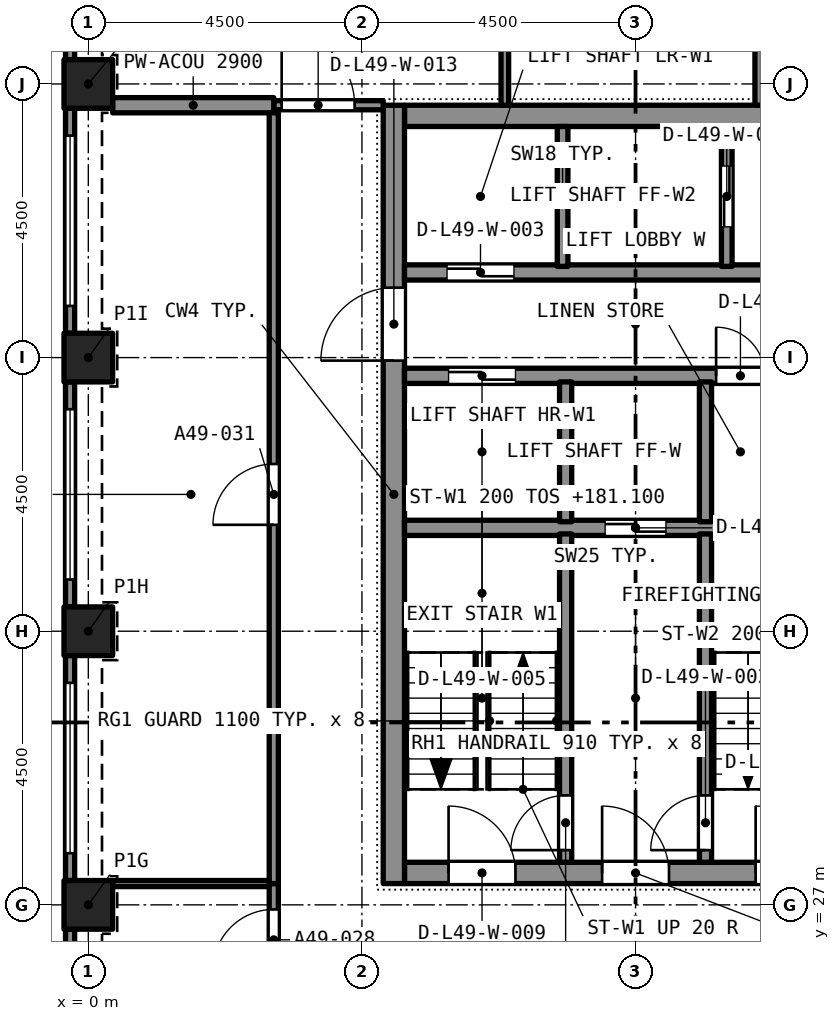
"""IFC4 building model, lengths in metres.
Left out: names, types, materials, properties, quantities, classifications, styles, units other than length and angle.
Written with IfcOpenShell. Run it as: python <this file> out.ifc"""

import sys

from ifc_helpers import new_model, si_unit, direction, frame, frame_2d, origin, origin_2d, place, context, subcontext, project, spatial, rectangle, extrude, element, fill, save


model = new_model("IFC4")
c1 = context("Model", 3, precision=1e-05, world=origin(), true_north=direction((0.0, 1.0)))
c2 = subcontext(c1, "Body", "Model", "MODEL_VIEW")
j1 = project(units=[si_unit("LENGTHUNIT", "METRE"), si_unit("PLANEANGLEUNIT", "RADIAN")], contexts=[c1])
p1 = place(None, origin())
s1 = spatial("IfcSite", under=j1, at=p1, CompositionType="ELEMENT")
p2 = place(p1, origin())
s2 = spatial("IfcBuilding", under=s1, at=p2, CompositionType="ELEMENT")
p3 = place(p2, frame((0.0, 0.0, 179.5)))
s3 = spatial("IfcBuildingStorey", under=s2, at=p3, CompositionType="ELEMENT", Elevation=179.5)
for number, where, z_axis, x_axis in (
    (1, (0.0, 27.0, 0.0), (0.0, 0.0, 1.0), (1.0, 0.0, 0.0)),
    (2, (0.0, 31.5, 0.0), (0.0, 0.0, 1.0), (1.0, 0.0, 0.0)),
    (3, (0.0, 36.0, 0.0), (0.0, 0.0, 1.0), (1.0, 0.0, 0.0)),
    (4, (0.0, 40.5, 0.0), (0.0, 0.0, 1.0), (1.0, 0.0, 0.0)),
):
    element("IfcColumn", number, at=place(p3, frame(where, z_axis=z_axis, x_axis=x_axis)), inside=s3, PredefinedType="COLUMN", context=c2, shape_type="SweptSolid", body=[
        extrude(rectangle(XDim=0.8, YDim=0.8, at=origin_2d()), origin(), (0.0, 0.0, 1.0), 3.2),
    ])
p4 = place(p3, frame((5.2, 27.525, 0.0), z_axis=(0.0, 0.0, 1.0), x_axis=(1.0, 0.0, 0.0)))
e5 = element("IfcWall", 5, at=p4, inside=s3, PredefinedType="SOLIDWALL", context=c2, shape_type="SweptSolid", body=[
    extrude(rectangle(XDim=7.6, YDim=0.35, at=frame_2d((3.8, 0.0))), origin(), (0.0, 0.0, 1.0), 3.2),
])
p5 = place(p4, frame((0.725, 0.0, 0.0)))
e6 = element("IfcOpeningElement", 6, at=p5, cuts=e5, PredefinedType="OPENING", context=c2, shape_type="SweptSolid", body=[
    extrude(rectangle(XDim=1.1, YDim=2.1, at=frame_2d((0.55, 1.05))), frame((0.0, 0.185, 0.0), z_axis=(0.0, -1.0, 0.0), x_axis=(1.0, 0.0, 0.0)), (0.0, 0.0, 1.0), 0.37),
])
p6 = place(p4, frame((3.25, 0.0, 0.0)))
e7 = element("IfcOpeningElement", 7, at=p6, cuts=e5, PredefinedType="OPENING", context=c2, shape_type="SweptSolid", body=[
    extrude(rectangle(XDim=1.1, YDim=2.1, at=frame_2d((0.55, 1.05))), frame((0.0, 0.185, 0.0), z_axis=(0.0, -1.0, 0.0), x_axis=(1.0, 0.0, 0.0)), (0.0, 0.0, 1.0), 0.37),
])
p7 = place(p4, frame((5.775, 0.0, 0.0)))
e8 = element("IfcOpeningElement", 8, at=p7, cuts=e5, PredefinedType="OPENING", context=c2, shape_type="SweptSolid", body=[
    extrude(rectangle(XDim=1.1, YDim=2.1, at=frame_2d((0.55, 1.05))), frame((0.0, 0.185, 0.0), z_axis=(0.0, -1.0, 0.0), x_axis=(1.0, 0.0, 0.0)), (0.0, 0.0, 1.0), 0.37),
])
p8 = place(p3, frame((5.2, 39.975, 0.0), z_axis=(0.0, 0.0, 1.0), x_axis=(1.0, 0.0, 0.0)))
e9 = element("IfcWall", 9, at=p8, inside=s3, PredefinedType="SOLIDWALL", context=c2, shape_type="SweptSolid", body=[
    extrude(rectangle(XDim=7.6, YDim=0.35, at=frame_2d((3.8, 0.0))), origin(), (0.0, 0.0, 1.0), 3.2),
])
p9 = place(p3, frame((5.025, 27.35, 0.0), z_axis=(0.0, 0.0, 1.0), x_axis=(0.0, 1.0, 0.0)))
e10 = element("IfcWall", 10, at=p9, inside=s3, PredefinedType="SOLIDWALL", context=c2, shape_type="SweptSolid", body=[
    extrude(rectangle(XDim=12.8, YDim=0.35, at=frame_2d((6.4, 0.0))), origin(), (0.0, 0.0, 1.0), 3.2),
])
p10 = place(p9, frame((8.6, 0.0, 0.0)))
e11 = element("IfcOpeningElement", 11, at=p10, cuts=e10, PredefinedType="OPENING", context=c2, shape_type="SweptSolid", body=[
    extrude(rectangle(XDim=1.2, YDim=2.1, at=frame_2d((0.6, 1.05))), frame((0.0, 0.185, 0.0), z_axis=(0.0, -1.0, 0.0), x_axis=(1.0, 0.0, 0.0)), (0.0, 0.0, 1.0), 0.37),
])
p11 = place(p3, frame((-0.3, 40.9, 0.0), z_axis=(0.0, 0.0, 1.0), x_axis=(0.0, 1.0, 0.0)))
e12 = element("IfcWall", 12, at=p11, inside=s3, PredefinedType="SOLIDWALL", context=c2, shape_type="SweptSolid", body=[
    extrude(rectangle(XDim=3.7, YDim=0.15, at=frame_2d((1.85, 0.0))), origin(), (0.0, 0.0, 1.0), 3.2),
])
p12 = place(p11, frame((0.45, 0.0, 0.45)))
e13 = element("IfcOpeningElement", 13, at=p12, cuts=e12, PredefinedType="OPENING", context=c2, shape_type="SweptSolid", body=[
    extrude(rectangle(XDim=2.8, YDim=1.95, at=frame_2d((1.4, 0.975))), frame((0.0, 0.085, 0.0), z_axis=(0.0, -1.0, 0.0), x_axis=(1.0, 0.0, 0.0)), (0.0, 0.0, 1.0), 0.17),
])
p13 = place(p3, frame((-0.3, 36.4, 0.0), z_axis=(0.0, 0.0, 1.0), x_axis=(0.0, 1.0, 0.0)))
e14 = element("IfcWall", 14, at=p13, inside=s3, PredefinedType="SOLIDWALL", context=c2, shape_type="SweptSolid", body=[
    extrude(rectangle(XDim=3.7, YDim=0.15, at=frame_2d((1.85, 0.0))), origin(), (0.0, 0.0, 1.0), 3.2),
])
p14 = place(p13, frame((0.45, 0.0, 0.45)))
e15 = element("IfcOpeningElement", 15, at=p14, cuts=e14, PredefinedType="OPENING", context=c2, shape_type="SweptSolid", body=[
    extrude(rectangle(XDim=2.8, YDim=1.95, at=frame_2d((1.4, 0.975))), frame((0.0, 0.085, 0.0), z_axis=(0.0, -1.0, 0.0), x_axis=(1.0, 0.0, 0.0)), (0.0, 0.0, 1.0), 0.17),
])
p15 = place(p3, frame((-0.3, 31.9, 0.0), z_axis=(0.0, 0.0, 1.0), x_axis=(0.0, 1.0, 0.0)))
e16 = element("IfcWall", 16, at=p15, inside=s3, PredefinedType="SOLIDWALL", context=c2, shape_type="SweptSolid", body=[
    extrude(rectangle(XDim=3.7, YDim=0.15, at=frame_2d((1.85, 0.0))), origin(), (0.0, 0.0, 1.0), 3.2),
])
p16 = place(p15, frame((0.45, 0.0, 0.45)))
e17 = element("IfcOpeningElement", 17, at=p16, cuts=e16, PredefinedType="OPENING", context=c2, shape_type="SweptSolid", body=[
    extrude(rectangle(XDim=2.8, YDim=1.95, at=frame_2d((1.4, 0.975))), frame((0.0, 0.085, 0.0), z_axis=(0.0, -1.0, 0.0), x_axis=(1.0, 0.0, 0.0)), (0.0, 0.0, 1.0), 0.17),
])
p17 = place(p3, frame((-0.3, 27.4, 0.0), z_axis=(0.0, 0.0, 1.0), x_axis=(0.0, 1.0, 0.0)))
e18 = element("IfcWall", 18, at=p17, inside=s3, PredefinedType="SOLIDWALL", context=c2, shape_type="SweptSolid", body=[
    extrude(rectangle(XDim=3.7, YDim=0.15, at=frame_2d((1.85, 0.0))), origin(), (0.0, 0.0, 1.0), 3.2),
])
p18 = place(p17, frame((0.45, 0.0, 0.45)))
e19 = element("IfcOpeningElement", 19, at=p18, cuts=e18, PredefinedType="OPENING", context=c2, shape_type="SweptSolid", body=[
    extrude(rectangle(XDim=2.8, YDim=1.95, at=frame_2d((1.4, 0.975))), frame((0.0, 0.085, 0.0), z_axis=(0.0, -1.0, 0.0), x_axis=(1.0, 0.0, 0.0)), (0.0, 0.0, 1.0), 0.17),
])
p19 = place(p3, frame((-0.3, 22.9, 0.0), z_axis=(0.0, 0.0, 1.0), x_axis=(0.0, 1.0, 0.0)))
e20 = element("IfcWall", 20, at=p19, inside=s3, PredefinedType="SOLIDWALL", context=c2, shape_type="SweptSolid", body=[
    extrude(rectangle(XDim=3.7, YDim=0.15, at=frame_2d((1.85, 0.0))), origin(), (0.0, 0.0, 1.0), 3.2),
])
p20 = place(p19, frame((0.45, 0.0, 0.45)))
e21 = element("IfcOpeningElement", 21, at=p20, cuts=e20, PredefinedType="OPENING", context=c2, shape_type="SweptSolid", body=[
    extrude(rectangle(XDim=2.8, YDim=1.95, at=frame_2d((1.4, 0.975))), frame((0.0, 0.085, 0.0), z_axis=(0.0, -1.0, 0.0), x_axis=(1.0, 0.0, 0.0)), (0.0, 0.0, 1.0), 0.17),
])
for number, where, z_axis, x_axis in (
    (22, (6.85, 40.15, 0.0), (0.0, 0.0, 1.0), (0.0, 1.0, 0.0)),
    (23, (11.026, 40.15, 0.0), (0.0, 0.0, 1.0), (0.0, 1.0, 0.0)),
):
    element("IfcWall", number, at=place(p3, frame(where, z_axis=z_axis, x_axis=x_axis)), inside=s3, PredefinedType="PARTITIONING", context=c2, shape_type="SweptSolid", body=[
        extrude(rectangle(XDim=3.368, YDim=0.125, at=frame_2d((1.684, 0.0))), origin(), (0.0, 0.0, 1.0), 2.9),
    ])
p21 = place(p3, frame((3.05, 40.15, 0.0), z_axis=(0.0, 0.0, 1.0), x_axis=(1.0, 0.0, 0.0)))
e24 = element("IfcWall", 24, at=p21, inside=s3, PredefinedType="PARTITIONING", context=c2, shape_type="SweptSolid", body=[
    extrude(rectangle(XDim=1.8, YDim=0.15, at=frame_2d((0.9, 0.0))), origin(), (0.0, 0.0, 1.0), 2.9),
])
p22 = place(p21, frame((0.13, 0.0, 0.0)))
e25 = element("IfcOpeningElement", 25, at=p22, cuts=e24, PredefinedType="OPENING", context=c2, shape_type="SweptSolid", body=[
    extrude(rectangle(XDim=1.2, YDim=2.4, at=frame_2d((0.6, 1.2))), frame((0.0, 0.085, 0.0), z_axis=(0.0, -1.0, 0.0), x_axis=(1.0, 0.0, 0.0)), (0.0, 0.0, 1.0), 0.17),
])
p23 = place(p3, frame((0.4, 40.15, 0.0), z_axis=(0.0, 0.0, 1.0), x_axis=(1.0, 0.0, 0.0)))
e26 = element("IfcWall", 26, at=p23, inside=s3, PredefinedType="PARTITIONING", context=c2, shape_type="SweptSolid", body=[
    extrude(rectangle(XDim=2.65, YDim=0.25, at=frame_2d((1.325, 0.0))), origin(), (0.0, 0.0, 1.0), 2.9),
])
p24 = place(p3, frame((3.05, 25.425, 0.0), z_axis=(0.0, 0.0, 1.0), x_axis=(0.0, 1.0, 0.0)))
e27 = element("IfcWall", 27, at=p24, inside=s3, PredefinedType="PARTITIONING", context=c2, shape_type="SweptSolid", body=[
    extrude(rectangle(XDim=1.925, YDim=0.15, at=frame_2d((0.962, 0.0))), origin(), (0.0, 0.0, 1.0), 2.9),
])
p25 = place(p24, frame((0.5, 0.0, 0.0)))
e28 = element("IfcOpeningElement", 28, at=p25, cuts=e27, PredefinedType="OPENING", context=c2, shape_type="SweptSolid", body=[
    extrude(rectangle(XDim=1.0, YDim=2.1, at=frame_2d((0.5, 1.05))), frame((0.0, 0.085, 0.0), z_axis=(0.0, -1.0, 0.0), x_axis=(1.0, 0.0, 0.0)), (0.0, 0.0, 1.0), 0.17),
])
p26 = place(p3, frame((3.05, 27.35, 0.0), z_axis=(0.0, 0.0, 1.0), x_axis=(0.0, 1.0, 0.0)))
e29 = element("IfcWall", 29, at=p26, inside=s3, PredefinedType="PARTITIONING", context=c2, shape_type="SweptSolid", body=[
    extrude(rectangle(XDim=12.675, YDim=0.15, at=frame_2d((6.337, 0.0))), origin(), (0.0, 0.0, 1.0), 2.9),
])
p27 = place(p26, frame((5.9, 0.0, 0.0)))
e30 = element("IfcOpeningElement", 30, at=p27, cuts=e29, PredefinedType="OPENING", context=c2, shape_type="SweptSolid", body=[
    extrude(rectangle(XDim=1.0, YDim=2.1, at=frame_2d((0.5, 1.05))), frame((0.0, 0.085, 0.0), z_axis=(0.0, -1.0, 0.0), x_axis=(1.0, 0.0, 0.0)), (0.0, 0.0, 1.0), 0.17),
])
p28 = place(p3, frame((0.4, 27.35, 0.0), z_axis=(0.0, 0.0, 1.0), x_axis=(1.0, 0.0, 0.0)))
e31 = element("IfcWall", 31, at=p28, inside=s3, PredefinedType="PARTITIONING", context=c2, shape_type="SweptSolid", body=[
    extrude(rectangle(XDim=2.575, YDim=0.1, at=frame_2d((1.288, 0.0))), origin(), (0.0, 0.0, 1.0), 2.9),
])
p29 = place(p3, frame((5.2, 33.2, 0.0), z_axis=(0.0, 0.0, 1.0), x_axis=(1.0, 0.0, 0.0)))
e32 = element("IfcWall", 32, at=p29, inside=s3, PredefinedType="SOLIDWALL", context=c2, shape_type="SweptSolid", body=[
    extrude(rectangle(XDim=7.6, YDim=0.25, at=frame_2d((3.8, 0.0))), origin(), (0.0, 0.0, 1.0), 2.9),
])
p30 = place(p29, frame((3.3, 0.0, 0.0)))
e33 = element("IfcOpeningElement", 33, at=p30, cuts=e32, PredefinedType="OPENING", context=c2, shape_type="SweptSolid", body=[
    extrude(rectangle(XDim=1.0, YDim=2.1, at=frame_2d((0.5, 1.05))), frame((0.0, 0.135, 0.0), z_axis=(0.0, -1.0, 0.0), x_axis=(1.0, 0.0, 0.0)), (0.0, 0.0, 1.0), 0.27),
])
p31 = place(p3, frame((5.2, 35.7, 0.0), z_axis=(0.0, 0.0, 1.0), x_axis=(1.0, 0.0, 0.0)))
e34 = element("IfcWall", 34, at=p31, inside=s3, PredefinedType="SOLIDWALL", context=c2, shape_type="SweptSolid", body=[
    extrude(rectangle(XDim=7.6, YDim=0.25, at=frame_2d((3.8, 0.0))), origin(), (0.0, 0.0, 1.0), 2.9),
])
p32 = place(p31, frame((0.725, 0.0, 0.0)))
e35 = element("IfcOpeningElement", 35, at=p32, cuts=e34, PredefinedType="OPENING", context=c2, shape_type="SweptSolid", body=[
    extrude(rectangle(XDim=1.1, YDim=2.4, at=frame_2d((0.55, 1.2))), frame((0.0, 0.135, 0.0), z_axis=(0.0, -1.0, 0.0), x_axis=(1.0, 0.0, 0.0)), (0.0, 0.0, 1.0), 0.27),
])
p33 = place(p31, frame((5.125, 0.0, 0.0)))
e36 = element("IfcOpeningElement", 36, at=p33, cuts=e34, PredefinedType="OPENING", context=c2, shape_type="SweptSolid", body=[
    extrude(rectangle(XDim=0.8, YDim=2.1, at=frame_2d((0.4, 1.05))), frame((0.0, 0.135, 0.0), z_axis=(0.0, -1.0, 0.0), x_axis=(1.0, 0.0, 0.0)), (0.0, 0.0, 1.0), 0.27),
])
p34 = place(p31, frame((6.45, 0.0, 0.0)))
e37 = element("IfcOpeningElement", 37, at=p34, cuts=e34, PredefinedType="OPENING", context=c2, shape_type="SweptSolid", body=[
    extrude(rectangle(XDim=0.9, YDim=2.1, at=frame_2d((0.45, 1.05))), frame((0.0, 0.135, 0.0), z_axis=(0.0, -1.0, 0.0), x_axis=(1.0, 0.0, 0.0)), (0.0, 0.0, 1.0), 0.27),
])
p35 = place(p3, frame((5.2, 37.4, 0.0), z_axis=(0.0, 0.0, 1.0), x_axis=(1.0, 0.0, 0.0)))
e38 = element("IfcWall", 38, at=p35, inside=s3, PredefinedType="SOLIDWALL", context=c2, shape_type="SweptSolid", body=[
    extrude(rectangle(XDim=7.6, YDim=0.25, at=frame_2d((3.8, 0.0))), origin(), (0.0, 0.0, 1.0), 2.9),
])
p36 = place(p35, frame((0.7, 0.0, 0.0)))
e39 = element("IfcOpeningElement", 39, at=p36, cuts=e38, PredefinedType="OPENING", context=c2, shape_type="SweptSolid", body=[
    extrude(rectangle(XDim=1.1, YDim=2.4, at=frame_2d((0.55, 1.2))), frame((0.0, 0.135, 0.0), z_axis=(0.0, -1.0, 0.0), x_axis=(1.0, 0.0, 0.0)), (0.0, 0.0, 1.0), 0.27),
])
p37 = place(p3, frame((7.85, 27.7, 0.0), z_axis=(0.0, 0.0, 1.0), x_axis=(0.0, 1.0, 0.0)))
e40 = element("IfcWall", 40, at=p37, inside=s3, PredefinedType="SOLIDWALL", context=c2, shape_type="SweptSolid", body=[
    extrude(rectangle(XDim=5.4, YDim=0.2, at=frame_2d((2.7, 0.0))), origin(), (0.0, 0.0, 1.0), 2.9),
])
p38 = place(p37, frame((0.2, 0.0, 0.0)))
e41 = element("IfcOpeningElement", 41, at=p38, cuts=e40, PredefinedType="OPENING", context=c2, shape_type="SweptSolid", body=[
    extrude(rectangle(XDim=0.9, YDim=2.1, at=frame_2d((0.45, 1.05))), frame((0.0, 0.11, 0.0), z_axis=(0.0, -1.0, 0.0), x_axis=(1.0, 0.0, 0.0)), (0.0, 0.0, 1.0), 0.22),
])
p39 = place(p3, frame((10.15, 27.7, 0.0), z_axis=(0.0, 0.0, 1.0), x_axis=(0.0, 1.0, 0.0)))
e42 = element("IfcWall", 42, at=p39, inside=s3, PredefinedType="SOLIDWALL", context=c2, shape_type="SweptSolid", body=[
    extrude(rectangle(XDim=5.4, YDim=0.2, at=frame_2d((2.7, 0.0))), origin(), (0.0, 0.0, 1.0), 2.9),
])
p40 = place(p39, frame((0.2, 0.0, 0.0)))
e43 = element("IfcOpeningElement", 43, at=p40, cuts=e42, PredefinedType="OPENING", context=c2, shape_type="SweptSolid", body=[
    extrude(rectangle(XDim=0.9, YDim=2.1, at=frame_2d((0.45, 1.05))), frame((0.0, 0.11, 0.0), z_axis=(0.0, -1.0, 0.0), x_axis=(1.0, 0.0, 0.0)), (0.0, 0.0, 1.0), 0.22),
])
for number, where, z_axis, x_axis in (
    (44, (7.85, 33.3, 0.0), (0.0, 0.0, 1.0), (0.0, 1.0, 0.0)),
    (45, (10.15, 33.3, 0.0), (0.0, 0.0, 1.0), (0.0, 1.0, 0.0)),
):
    element("IfcWall", number, at=place(p3, frame(where, z_axis=z_axis, x_axis=x_axis)), inside=s3, PredefinedType="SOLIDWALL", context=c2, shape_type="SweptSolid", body=[
        extrude(rectangle(XDim=2.3, YDim=0.2, at=frame_2d((1.15, 0.0))), origin(), (0.0, 0.0, 1.0), 2.9),
    ])
p41 = place(p3, frame((7.8, 37.5, 0.0), z_axis=(0.0, 0.0, 1.0), x_axis=(0.0, 1.0, 0.0)))
e46 = element("IfcWall", 46, at=p41, inside=s3, PredefinedType="SOLIDWALL", context=c2, shape_type="SweptSolid", body=[
    extrude(rectangle(XDim=2.3, YDim=0.175, at=frame_2d((1.15, 0.0))), origin(), (0.0, 0.0, 1.0), 2.9),
])
p42 = place(p3, frame((10.5, 37.5, 0.0), z_axis=(0.0, 0.0, 1.0), x_axis=(0.0, 1.0, 0.0)))
e47 = element("IfcWall", 47, at=p42, inside=s3, PredefinedType="SOLIDWALL", context=c2, shape_type="SweptSolid", body=[
    extrude(rectangle(XDim=2.3, YDim=0.175, at=frame_2d((1.15, 0.0))), origin(), (0.0, 0.0, 1.0), 2.9),
])
p43 = place(p42, frame((0.65, 0.0, 0.0)))
e48 = element("IfcOpeningElement", 48, at=p43, cuts=e47, PredefinedType="OPENING", context=c2, shape_type="SweptSolid", body=[
    extrude(rectangle(XDim=1.0, YDim=2.1, at=frame_2d((0.5, 1.05))), frame((0.0, 0.097, 0.0), z_axis=(0.0, -1.0, 0.0), x_axis=(1.0, 0.0, 0.0)), (0.0, 0.0, 1.0), 0.195),
])
p44 = place(p14, origin())
e49 = element("IfcWindow", 49, at=p44, inside=s3, PartitioningType="SINGLE_PANEL", PredefinedType="WINDOW", context=c2, shape_type="SweptSolid", body=[
    extrude(rectangle(XDim=2.8, YDim=1.95, at=frame_2d((1.4, 0.975))), frame((0.0, 0.03, 0.0), z_axis=(0.0, -1.0, 0.0), x_axis=(1.0, 0.0, 0.0)), (0.0, 0.0, 1.0), 0.06),
])
fill(e15, e49)
p45 = place(p16, origin())
e50 = element("IfcWindow", 50, at=p45, inside=s3, PartitioningType="SINGLE_PANEL", PredefinedType="WINDOW", context=c2, shape_type="SweptSolid", body=[
    extrude(rectangle(XDim=2.8, YDim=1.95, at=frame_2d((1.4, 0.975))), frame((0.0, 0.03, 0.0), z_axis=(0.0, -1.0, 0.0), x_axis=(1.0, 0.0, 0.0)), (0.0, 0.0, 1.0), 0.06),
])
fill(e17, e50)
p46 = place(p18, origin())
e51 = element("IfcWindow", 51, at=p46, inside=s3, PartitioningType="SINGLE_PANEL", PredefinedType="WINDOW", context=c2, shape_type="SweptSolid", body=[
    extrude(rectangle(XDim=2.8, YDim=1.95, at=frame_2d((1.4, 0.975))), frame((0.0, 0.03, 0.0), z_axis=(0.0, -1.0, 0.0), x_axis=(1.0, 0.0, 0.0)), (0.0, 0.0, 1.0), 0.06),
])
fill(e19, e51)
p47 = place(p22, origin())
e52 = element("IfcDoor", 52, at=p47, inside=s3, OperationType="SINGLE_SWING_LEFT", PredefinedType="DOOR", context=c2, shape_type="SweptSolid", body=[
    extrude(rectangle(XDim=1.2, YDim=2.4, at=frame_2d((0.6, 1.2))), frame((0.0, 0.025, 0.0), z_axis=(0.0, -1.0, 0.0), x_axis=(1.0, 0.0, 0.0)), (0.0, 0.0, 1.0), 0.05),
])
fill(e25, e52)
p48 = place(p25, origin())
e53 = element("IfcDoor", 53, at=p48, inside=s3, OperationType="SINGLE_SWING_RIGHT", PredefinedType="DOOR", context=c2, shape_type="SweptSolid", body=[
    extrude(rectangle(XDim=1.0, YDim=2.1, at=frame_2d((0.5, 1.05))), frame((0.0, 0.025, 0.0), z_axis=(0.0, -1.0, 0.0), x_axis=(1.0, 0.0, 0.0)), (0.0, 0.0, 1.0), 0.05),
])
fill(e28, e53)
p49 = place(p27, origin())
e54 = element("IfcDoor", 54, at=p49, inside=s3, OperationType="SINGLE_SWING_RIGHT", PredefinedType="DOOR", context=c2, shape_type="SweptSolid", body=[
    extrude(rectangle(XDim=1.0, YDim=2.1, at=frame_2d((0.5, 1.05))), frame((0.0, 0.025, 0.0), z_axis=(0.0, -1.0, 0.0), x_axis=(1.0, 0.0, 0.0)), (0.0, 0.0, 1.0), 0.05),
])
fill(e30, e54)
p50 = place(p38, origin())
e55 = element("IfcDoor", 55, at=p50, inside=s3, OperationType="SINGLE_SWING_LEFT", PredefinedType="DOOR", context=c2, shape_type="SweptSolid", body=[
    extrude(rectangle(XDim=0.9, YDim=2.1, at=frame_2d((0.45, 1.05))), frame((0.0, 0.025, 0.0), z_axis=(0.0, -1.0, 0.0), x_axis=(1.0, 0.0, 0.0)), (0.0, 0.0, 1.0), 0.05),
])
fill(e41, e55)
p51 = place(p40, origin())
e56 = element("IfcDoor", 56, at=p51, inside=s3, OperationType="SINGLE_SWING_LEFT", PredefinedType="DOOR", context=c2, shape_type="SweptSolid", body=[
    extrude(rectangle(XDim=0.9, YDim=2.1, at=frame_2d((0.45, 1.05))), frame((0.0, 0.025, 0.0), z_axis=(0.0, -1.0, 0.0), x_axis=(1.0, 0.0, 0.0)), (0.0, 0.0, 1.0), 0.05),
])
fill(e43, e56)
p52 = place(p36, origin())
e57 = element("IfcDoor", 57, at=p52, inside=s3, OperationType="SLIDING_TO_LEFT", PredefinedType="DOOR", context=c2, shape_type="SweptSolid", body=[
    extrude(rectangle(XDim=1.1, YDim=2.4, at=frame_2d((0.55, 1.2))), frame((0.0, 0.025, 0.0), z_axis=(0.0, -1.0, 0.0), x_axis=(1.0, 0.0, 0.0)), (0.0, 0.0, 1.0), 0.05),
])
fill(e39, e57)
p53 = place(p43, origin())
e58 = element("IfcDoor", 58, at=p53, inside=s3, OperationType="SLIDING_TO_LEFT", PredefinedType="DOOR", context=c2, shape_type="SweptSolid", body=[
    extrude(rectangle(XDim=1.0, YDim=2.1, at=frame_2d((0.5, 1.05))), frame((0.0, 0.025, 0.0), z_axis=(0.0, -1.0, 0.0), x_axis=(1.0, 0.0, 0.0)), (0.0, 0.0, 1.0), 0.05),
])
fill(e48, e58)
p54 = place(p32, origin())
e59 = element("IfcDoor", 59, at=p54, inside=s3, OperationType="SLIDING_TO_LEFT", PredefinedType="DOOR", context=c2, shape_type="SweptSolid", body=[
    extrude(rectangle(XDim=1.1, YDim=2.4, at=frame_2d((0.55, 1.2))), frame((0.0, 0.025, 0.0), z_axis=(0.0, -1.0, 0.0), x_axis=(1.0, 0.0, 0.0)), (0.0, 0.0, 1.0), 0.05),
])
fill(e35, e59)
p55 = place(p30, origin())
e60 = element("IfcDoor", 60, at=p55, inside=s3, OperationType="SLIDING_TO_LEFT", PredefinedType="DOOR", context=c2, shape_type="SweptSolid", body=[
    extrude(rectangle(XDim=1.0, YDim=2.1, at=frame_2d((0.5, 1.05))), frame((0.0, 0.025, 0.0), z_axis=(0.0, -1.0, 0.0), x_axis=(1.0, 0.0, 0.0)), (0.0, 0.0, 1.0), 0.05),
])
fill(e33, e60)
p56 = place(p33, origin())
e61 = element("IfcDoor", 61, at=p56, inside=s3, OperationType="SINGLE_SWING_LEFT", PredefinedType="DOOR", context=c2, shape_type="SweptSolid", body=[
    extrude(rectangle(XDim=0.8, YDim=2.1, at=frame_2d((0.4, 1.05))), frame((0.0, 0.025, 0.0), z_axis=(0.0, -1.0, 0.0), x_axis=(1.0, 0.0, 0.0)), (0.0, 0.0, 1.0), 0.05),
])
fill(e36, e61)
p57 = place(p5, origin())
e62 = element("IfcDoor", 62, at=p57, inside=s3, OperationType="SINGLE_SWING_LEFT", PredefinedType="DOOR", context=c2, shape_type="SweptSolid", body=[
    extrude(rectangle(XDim=1.1, YDim=2.1, at=frame_2d((0.55, 1.05))), frame((0.0, 0.025, 0.0), z_axis=(0.0, -1.0, 0.0), x_axis=(1.0, 0.0, 0.0)), (0.0, 0.0, 1.0), 0.05),
])
fill(e6, e62)
p58 = place(p6, origin())
e63 = element("IfcDoor", 63, at=p58, inside=s3, OperationType="SINGLE_SWING_LEFT", PredefinedType="DOOR", context=c2, shape_type="SweptSolid", body=[
    extrude(rectangle(XDim=1.1, YDim=2.1, at=frame_2d((0.55, 1.05))), frame((0.0, 0.025, 0.0), z_axis=(0.0, -1.0, 0.0), x_axis=(1.0, 0.0, 0.0)), (0.0, 0.0, 1.0), 0.05),
])
fill(e7, e63)
p59 = place(p7, origin())
e64 = element("IfcDoor", 64, at=p59, inside=s3, OperationType="SINGLE_SWING_LEFT", PredefinedType="DOOR", context=c2, shape_type="SweptSolid", body=[
    extrude(rectangle(XDim=1.1, YDim=2.1, at=frame_2d((0.55, 1.05))), frame((0.0, 0.025, 0.0), z_axis=(0.0, -1.0, 0.0), x_axis=(1.0, 0.0, 0.0)), (0.0, 0.0, 1.0), 0.05),
])
fill(e8, e64)
p60 = place(p10, origin())
e65 = element("IfcDoor", 65, at=p60, inside=s3, OperationType="SINGLE_SWING_LEFT", PredefinedType="DOOR", context=c2, shape_type="SweptSolid", body=[
    extrude(rectangle(XDim=1.2, YDim=2.1, at=frame_2d((0.6, 1.05))), frame((0.0, 0.025, 0.0), z_axis=(0.0, -1.0, 0.0), x_axis=(1.0, 0.0, 0.0)), (0.0, 0.0, 1.0), 0.05),
])
fill(e11, e65)
save(model, sys.argv[1])
